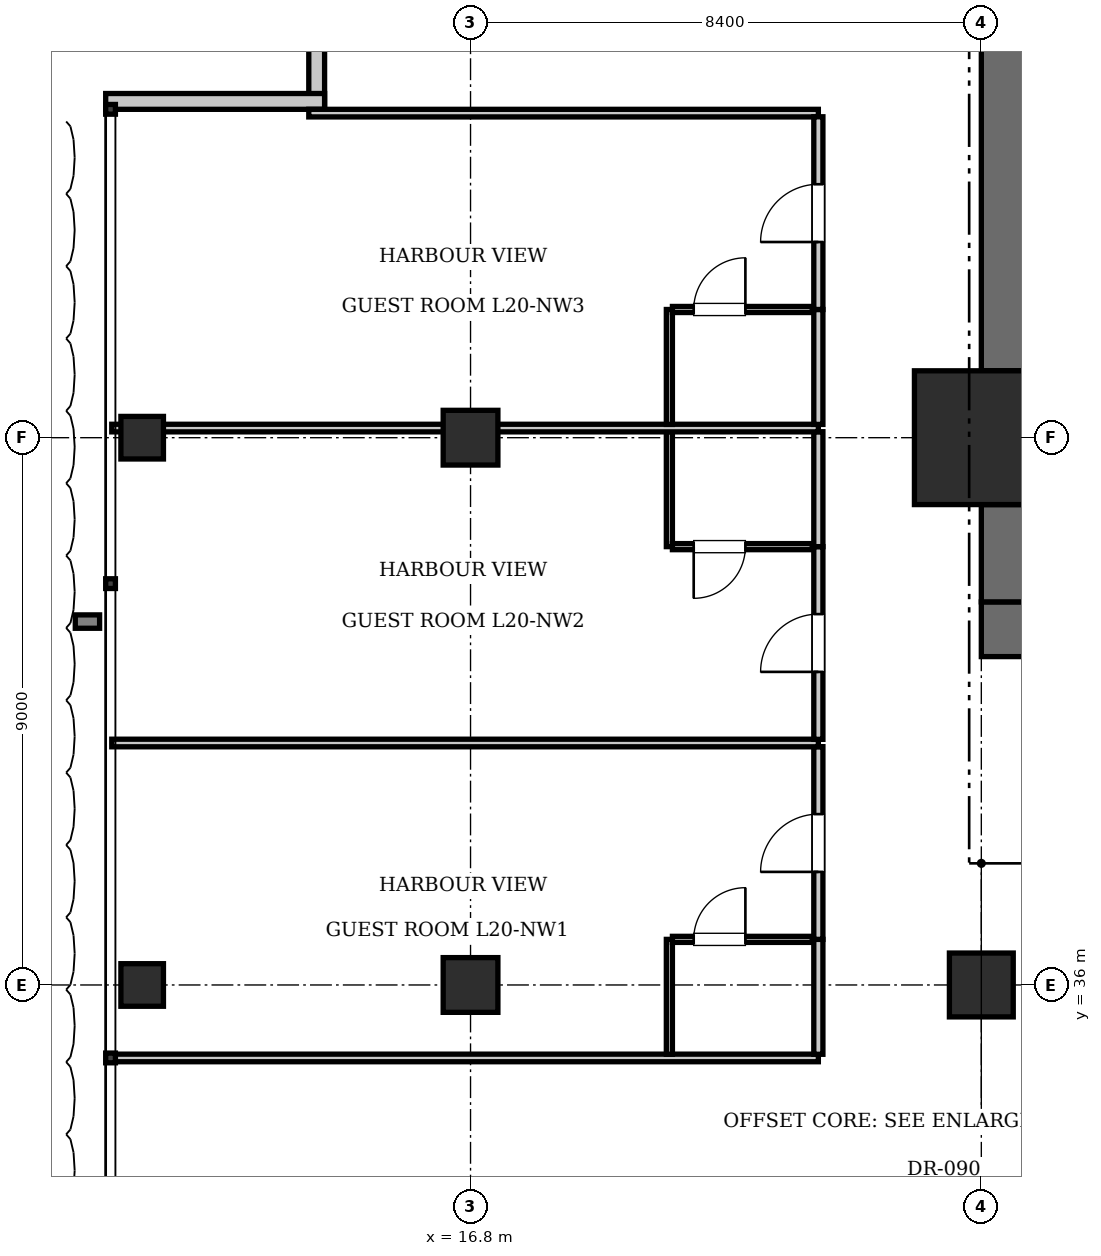
"""IFC4 building model, lengths in metres.
Left out: names, types, materials, properties, quantities, classifications, styles, units other than length and angle.
Written with IfcOpenShell. Run it as: python <this file> out.ifc"""

import sys

from ifc_helpers import new_model, si_unit, direction, frame, frame_2d, origin, origin_2d, place, context, subcontext, project, spatial, rectangle, i_section, extrude, element, fill, save


model = new_model("IFC4")
c1 = context("Model", 3, precision=1e-05, world=origin(), true_north=direction((0.0, 1.0)))
c2 = subcontext(c1, "Body", "Model", "MODEL_VIEW")
j1 = project(units=[si_unit("LENGTHUNIT", "METRE"), si_unit("PLANEANGLEUNIT", "RADIAN")], contexts=[c1])
p1 = place(None, origin())
s1 = spatial("IfcSite", under=j1, at=p1, CompositionType="ELEMENT")
p2 = place(p1, origin())
s2 = spatial("IfcBuilding", under=s1, at=p2, CompositionType="ELEMENT")
p3 = place(p2, frame((0.0, 0.0, 84.7)))
s3 = spatial("IfcBuildingStorey", under=s2, at=p3, CompositionType="ELEMENT", Elevation=84.7)
p4 = place(p3, frame((25.2, 45.0, 0.0), z_axis=(0.0, 0.0, 1.0), x_axis=(1.0, 0.0, 0.0)))
e1 = element("IfcColumn", 1, at=p4, inside=s3, PredefinedType="COLUMN", context=c2, shape_type="SweptSolid", body=[
    extrude(rectangle(XDim=2.2, YDim=2.2, at=origin_2d()), origin(), (0.0, 0.0, 1.0), 3.85),
])
p5 = place(p3, frame((25.2, 41.85, 0.0), z_axis=(0.0, 0.0, 1.0), x_axis=(1.0, 0.0, 0.0)))
e2 = element("IfcWall", 2, at=p5, inside=s3, PredefinedType="SHEAR", context=c2, shape_type="SweptSolid", body=[
    extrude(rectangle(XDim=6.8, YDim=0.9, at=frame_2d((3.4, 0.0))), origin(), (0.0, 0.0, 1.0), 3.85),
])
p6 = place(p5, frame((1.65, 0.0, 0.0)))
e3 = element("IfcOpeningElement", 3, at=p6, cuts=e2, PredefinedType="OPENING", context=c2, shape_type="SweptSolid", body=[
    extrude(rectangle(XDim=1.15, YDim=2.15, at=frame_2d((0.575, 1.075))), frame((0.0, 0.46, 0.0), z_axis=(0.0, -1.0, 0.0), x_axis=(1.0, 0.0, 0.0)), (0.0, 0.0, 1.0), 0.92),
])
p7 = place(p5, frame((5.15, 0.0, 0.0)))
e4 = element("IfcOpeningElement", 4, at=p7, cuts=e2, PredefinedType="OPENING", context=c2, shape_type="SweptSolid", body=[
    extrude(rectangle(XDim=1.1, YDim=2.2, at=frame_2d((0.55, 1.1))), frame((0.0, 0.46, 0.0), z_axis=(0.0, -1.0, 0.0), x_axis=(1.0, 0.0, 0.0)), (0.0, 0.0, 1.0), 0.92),
])
p8 = place(p3, frame((25.65, 42.3, 0.0), z_axis=(0.0, 0.0, 1.0), x_axis=(0.0, 1.0, 0.0)))
e5 = element("IfcWall", 5, at=p8, inside=s3, PredefinedType="SHEAR", context=c2, shape_type="SweptSolid", body=[
    extrude(rectangle(XDim=1.6, YDim=0.9, at=frame_2d((0.8, 0.0))), origin(), (0.0, 0.0, 1.0), 3.85),
])
p9 = place(p3, frame((25.65, 46.1, 0.0), z_axis=(0.0, 0.0, 1.0), x_axis=(0.0, 1.0, 0.0)))
e6 = element("IfcWall", 6, at=p9, inside=s3, PredefinedType="SHEAR", context=c2, shape_type="SweptSolid", body=[
    extrude(rectangle(XDim=7.0, YDim=0.9, at=frame_2d((3.5, 0.0))), origin(), (0.0, 0.0, 1.0), 3.85),
])
p10 = place(p3, frame((25.2, 36.0, 0.0), z_axis=(0.0, 0.0, 1.0), x_axis=(1.0, 0.0, 0.0)))
e7 = element("IfcColumn", 7, at=p10, inside=s3, PredefinedType="COLUMN", context=c2, shape_type="SweptSolid", body=[
    extrude(rectangle(XDim=1.05, YDim=1.05, at=origin_2d()), origin(), (0.0, 0.0, 1.0), 3.85),
])
for number, where, z_axis, x_axis in (
    (8, (16.8, 36.0, 0.0), (0.0, 0.0, 1.0), (1.0, 0.0, 0.0)),
    (9, (16.8, 45.0, 0.0), (0.0, 0.0, 1.0), (1.0, 0.0, 0.0)),
):
    element("IfcColumn", number, at=place(p3, frame(where, z_axis=z_axis, x_axis=x_axis)), inside=s3, PredefinedType="COLUMN", context=c2, shape_type="SweptSolid", body=[
        extrude(rectangle(XDim=0.9, YDim=0.9, at=origin_2d()), origin(), (0.0, 0.0, 1.0), 3.85),
    ])
for number, where, z_axis, x_axis in (
    (10, (11.4, 36.0, 0.0), (0.0, 0.0, 1.0), (1.0, 0.0, 0.0)),
    (11, (11.4, 45.0, 0.0), (0.0, 0.0, 1.0), (1.0, 0.0, 0.0)),
):
    element("IfcColumn", number, at=place(p3, frame(where, z_axis=z_axis, x_axis=x_axis)), inside=s3, PredefinedType="COLUMN", context=c2, shape_type="SweptSolid", body=[
        extrude(i_section(OverallWidth=0.7, OverallDepth=0.7, WebThickness=0.028, FlangeThickness=0.044, at=origin_2d()), origin(), (0.0, 0.0, 1.0), 3.85),
    ])
p11 = place(p3, frame((14.27, 50.4, 0.0), z_axis=(0.0, 0.0, 1.0), x_axis=(0.0, 1.0, 0.0)))
e12 = element("IfcWall", 12, at=p11, inside=s3, PredefinedType="SOLIDWALL", context=c2, shape_type="SweptSolid", body=[
    extrude(rectangle(XDim=3.6, YDim=0.26, at=frame_2d((1.8, 0.0))), origin(), (0.0, 0.0, 1.0), 3.61),
])
p12 = place(p3, frame((10.8, 50.53, 0.0), z_axis=(0.0, 0.0, 1.0), x_axis=(1.0, 0.0, 0.0)))
e13 = element("IfcWall", 13, at=p12, inside=s3, PredefinedType="SOLIDWALL", context=c2, shape_type="SweptSolid", body=[
    extrude(rectangle(XDim=3.6, YDim=0.26, at=frame_2d((1.8, 0.0))), origin(), (0.0, 0.0, 1.0), 3.61),
])
p13 = place(p3, frame((10.9, 34.8, 0.0), z_axis=(0.0, 0.0, 1.0), x_axis=(1.0, 0.0, 0.0)))
e14 = element("IfcWall", 14, at=p13, inside=s3, PredefinedType="PARTITIONING", context=c2, shape_type="SweptSolid", body=[
    extrude(rectangle(XDim=11.62, YDim=0.125, at=frame_2d((5.81, 0.0))), origin(), (0.0, 0.0, 1.0), 3.61),
])
p14 = place(p3, frame((14.14, 50.337, 0.0), z_axis=(0.0, 0.0, 1.0), x_axis=(1.0, 0.0, 0.0)))
e15 = element("IfcWall", 15, at=p14, inside=s3, PredefinedType="PARTITIONING", context=c2, shape_type="SweptSolid", body=[
    extrude(rectangle(XDim=8.38, YDim=0.125, at=frame_2d((4.19, 0.0))), origin(), (0.0, 0.0, 1.0), 3.61),
])
p15 = place(p3, frame((22.52, 34.86, 0.0), z_axis=(0.0, 0.0, 1.0), x_axis=(0.0, 1.0, 0.0)))
e16 = element("IfcWall", 16, at=p15, inside=s3, PredefinedType="PARTITIONING", context=c2, shape_type="SweptSolid", body=[
    extrude(rectangle(XDim=1.89, YDim=0.15, at=frame_2d((0.945, 0.0))), origin(), (0.0, 0.0, 1.0), 3.61),
])
p16 = place(p3, frame((22.52, 36.75, 0.0), z_axis=(0.0, 0.0, 1.0), x_axis=(0.0, 1.0, 0.0)))
e17 = element("IfcWall", 17, at=p16, inside=s3, PredefinedType="PARTITIONING", context=c2, shape_type="SweptSolid", body=[
    extrude(rectangle(XDim=3.169, YDim=0.15, at=frame_2d((1.584, 0.0))), origin(), (0.0, 0.0, 1.0), 3.61),
])
p17 = place(p16, frame((1.11, 0.0, 0.0)))
e18 = element("IfcOpeningElement", 18, at=p17, cuts=e17, PredefinedType="OPENING", context=c2, shape_type="SweptSolid", body=[
    extrude(rectangle(XDim=0.95, YDim=2.15, at=frame_2d((0.475, 1.075))), frame((0.0, 0.085, 0.0), z_axis=(0.0, -1.0, 0.0), x_axis=(1.0, 0.0, 0.0)), (0.0, 0.0, 1.0), 0.17),
])
p18 = place(p3, frame((20.07, 34.86, 0.0), z_axis=(0.0, 0.0, 1.0), x_axis=(0.0, 1.0, 0.0)))
e19 = element("IfcWall", 19, at=p18, inside=s3, PredefinedType="PARTITIONING", context=c2, shape_type="SweptSolid", body=[
    extrude(rectangle(XDim=1.89, YDim=0.1, at=frame_2d((0.945, 0.0))), origin(), (0.0, 0.0, 1.0), 3.61),
])
p19 = place(p3, frame((20.12, 36.75, 0.0), z_axis=(0.0, 0.0, 1.0), x_axis=(1.0, 0.0, 0.0)))
e20 = element("IfcWall", 20, at=p19, inside=s3, PredefinedType="PARTITIONING", context=c2, shape_type="SweptSolid", body=[
    extrude(rectangle(XDim=2.3, YDim=0.1, at=frame_2d((1.15, 0.0))), origin(), (0.0, 0.0, 1.0), 3.61),
])
p20 = place(p19, frame((0.35, 0.0, 0.0)))
e21 = element("IfcOpeningElement", 21, at=p20, cuts=e20, PredefinedType="OPENING", context=c2, shape_type="SweptSolid", body=[
    extrude(rectangle(XDim=0.85, YDim=2.1, at=frame_2d((0.425, 1.05))), frame((0.0, 0.06, 0.0), z_axis=(0.0, -1.0, 0.0), x_axis=(1.0, 0.0, 0.0)), (0.0, 0.0, 1.0), 0.12),
])
p21 = place(p3, frame((10.9, 39.979, 0.0), z_axis=(0.0, 0.0, 1.0), x_axis=(1.0, 0.0, 0.0)))
e22 = element("IfcWall", 22, at=p21, inside=s3, PredefinedType="PARTITIONING", context=c2, shape_type="SweptSolid", body=[
    extrude(rectangle(XDim=11.62, YDim=0.125, at=frame_2d((5.81, 0.0))), origin(), (0.0, 0.0, 1.0), 3.61),
])
p22 = place(p3, frame((22.52, 40.039, 0.0), z_axis=(0.0, 0.0, 1.0), x_axis=(0.0, 1.0, 0.0)))
e23 = element("IfcWall", 23, at=p22, inside=s3, PredefinedType="PARTITIONING", context=c2, shape_type="SweptSolid", body=[
    extrude(rectangle(XDim=3.169, YDim=0.15, at=frame_2d((1.584, 0.0))), origin(), (0.0, 0.0, 1.0), 3.61),
])
p23 = place(p22, frame((1.11, 0.0, 0.0)))
e24 = element("IfcOpeningElement", 24, at=p23, cuts=e23, PredefinedType="OPENING", context=c2, shape_type="SweptSolid", body=[
    extrude(rectangle(XDim=0.95, YDim=2.15, at=frame_2d((0.475, 1.075))), frame((0.0, 0.085, 0.0), z_axis=(0.0, -1.0, 0.0), x_axis=(1.0, 0.0, 0.0)), (0.0, 0.0, 1.0), 0.17),
])
p24 = place(p3, frame((22.52, 43.208, 0.0), z_axis=(0.0, 0.0, 1.0), x_axis=(0.0, 1.0, 0.0)))
e25 = element("IfcWall", 25, at=p24, inside=s3, PredefinedType="PARTITIONING", context=c2, shape_type="SweptSolid", body=[
    extrude(rectangle(XDim=1.89, YDim=0.15, at=frame_2d((0.945, 0.0))), origin(), (0.0, 0.0, 1.0), 3.61),
])
p25 = place(p3, frame((20.07, 43.208, 0.0), z_axis=(0.0, 0.0, 1.0), x_axis=(0.0, 1.0, 0.0)))
e26 = element("IfcWall", 26, at=p25, inside=s3, PredefinedType="PARTITIONING", context=c2, shape_type="SweptSolid", body=[
    extrude(rectangle(XDim=1.89, YDim=0.1, at=frame_2d((0.945, 0.0))), origin(), (0.0, 0.0, 1.0), 3.61),
])
p26 = place(p3, frame((20.12, 43.208, 0.0), z_axis=(0.0, 0.0, 1.0), x_axis=(1.0, 0.0, 0.0)))
e27 = element("IfcWall", 27, at=p26, inside=s3, PredefinedType="PARTITIONING", context=c2, shape_type="SweptSolid", body=[
    extrude(rectangle(XDim=2.3, YDim=0.1, at=frame_2d((1.15, 0.0))), origin(), (0.0, 0.0, 1.0), 3.61),
])
p27 = place(p26, frame((0.35, 0.0, 0.0)))
e28 = element("IfcOpeningElement", 28, at=p27, cuts=e27, PredefinedType="OPENING", context=c2, shape_type="SweptSolid", body=[
    extrude(rectangle(XDim=0.85, YDim=2.1, at=frame_2d((0.425, 1.05))), frame((0.0, 0.06, 0.0), z_axis=(0.0, -1.0, 0.0), x_axis=(1.0, 0.0, 0.0)), (0.0, 0.0, 1.0), 0.12),
])
p28 = place(p3, frame((10.9, 45.158, 0.0), z_axis=(0.0, 0.0, 1.0), x_axis=(1.0, 0.0, 0.0)))
e29 = element("IfcWall", 29, at=p28, inside=s3, PredefinedType="PARTITIONING", context=c2, shape_type="SweptSolid", body=[
    extrude(rectangle(XDim=11.62, YDim=0.125, at=frame_2d((5.81, 0.0))), origin(), (0.0, 0.0, 1.0), 2.999),
])
p29 = place(p3, frame((22.52, 45.218, 0.0), z_axis=(0.0, 0.0, 1.0), x_axis=(0.0, 1.0, 0.0)))
e30 = element("IfcWall", 30, at=p29, inside=s3, PredefinedType="PARTITIONING", context=c2, shape_type="SweptSolid", body=[
    extrude(rectangle(XDim=1.89, YDim=0.15, at=frame_2d((0.945, 0.0))), origin(), (0.0, 0.0, 1.0), 3.61),
])
p30 = place(p3, frame((22.52, 47.108, 0.0), z_axis=(0.0, 0.0, 1.0), x_axis=(0.0, 1.0, 0.0)))
e31 = element("IfcWall", 31, at=p30, inside=s3, PredefinedType="PARTITIONING", context=c2, shape_type="SweptSolid", body=[
    extrude(rectangle(XDim=3.169, YDim=0.15, at=frame_2d((1.584, 0.0))), origin(), (0.0, 0.0, 1.0), 3.61),
])
p31 = place(p30, frame((1.11, 0.0, 0.0)))
e32 = element("IfcOpeningElement", 32, at=p31, cuts=e31, PredefinedType="OPENING", context=c2, shape_type="SweptSolid", body=[
    extrude(rectangle(XDim=0.95, YDim=2.15, at=frame_2d((0.475, 1.075))), frame((0.0, 0.085, 0.0), z_axis=(0.0, -1.0, 0.0), x_axis=(1.0, 0.0, 0.0)), (0.0, 0.0, 1.0), 0.17),
])
p32 = place(p3, frame((20.07, 45.218, 0.0), z_axis=(0.0, 0.0, 1.0), x_axis=(0.0, 1.0, 0.0)))
e33 = element("IfcWall", 33, at=p32, inside=s3, PredefinedType="PARTITIONING", context=c2, shape_type="SweptSolid", body=[
    extrude(rectangle(XDim=1.89, YDim=0.1, at=frame_2d((0.945, 0.0))), origin(), (0.0, 0.0, 1.0), 3.61),
])
p33 = place(p3, frame((20.12, 47.108, 0.0), z_axis=(0.0, 0.0, 1.0), x_axis=(1.0, 0.0, 0.0)))
e34 = element("IfcWall", 34, at=p33, inside=s3, PredefinedType="PARTITIONING", context=c2, shape_type="SweptSolid", body=[
    extrude(rectangle(XDim=2.3, YDim=0.1, at=frame_2d((1.15, 0.0))), origin(), (0.0, 0.0, 1.0), 3.61),
])
p34 = place(p33, frame((0.35, 0.0, 0.0)))
e35 = element("IfcOpeningElement", 35, at=p34, cuts=e34, PredefinedType="OPENING", context=c2, shape_type="SweptSolid", body=[
    extrude(rectangle(XDim=0.85, YDim=2.1, at=frame_2d((0.425, 1.05))), frame((0.0, 0.06, 0.0), z_axis=(0.0, -1.0, 0.0), x_axis=(1.0, 0.0, 0.0)), (0.0, 0.0, 1.0), 0.12),
])
p35 = place(p20, origin())
e36 = element("IfcDoor", 36, at=p35, inside=s3, OperationType="SINGLE_SWING_RIGHT", PredefinedType="DOOR", context=c2, shape_type="SweptSolid", body=[
    extrude(rectangle(XDim=0.85, YDim=2.1, at=frame_2d((0.425, 1.05))), frame((0.0, 0.025, 0.0), z_axis=(0.0, -1.0, 0.0), x_axis=(1.0, 0.0, 0.0)), (0.0, 0.0, 1.0), 0.05),
])
fill(e21, e36)
p36 = place(p17, origin())
e37 = element("IfcDoor", 37, at=p36, inside=s3, OperationType="SINGLE_SWING_LEFT", PredefinedType="DOOR", context=c2, shape_type="SweptSolid", body=[
    extrude(rectangle(XDim=0.95, YDim=2.15, at=frame_2d((0.475, 1.075))), frame((0.0, 0.025, 0.0), z_axis=(0.0, -1.0, 0.0), x_axis=(1.0, 0.0, 0.0)), (0.0, 0.0, 1.0), 0.05),
])
fill(e18, e37)
p37 = place(p27, frame((0.85, 0.0, 0.0), z_axis=(0.0, 0.0, 1.0), x_axis=(-1.0, 0.0, 0.0)))
e38 = element("IfcDoor", 38, at=p37, inside=s3, OperationType="SINGLE_SWING_RIGHT", PredefinedType="DOOR", context=c2, shape_type="SweptSolid", body=[
    extrude(rectangle(XDim=0.85, YDim=2.1, at=frame_2d((0.425, 1.05))), frame((0.0, 0.025, 0.0), z_axis=(0.0, -1.0, 0.0), x_axis=(1.0, 0.0, 0.0)), (0.0, 0.0, 1.0), 0.05),
])
fill(e28, e38)
p38 = place(p23, origin())
e39 = element("IfcDoor", 39, at=p38, inside=s3, OperationType="SINGLE_SWING_LEFT", PredefinedType="DOOR", context=c2, shape_type="SweptSolid", body=[
    extrude(rectangle(XDim=0.95, YDim=2.15, at=frame_2d((0.475, 1.075))), frame((0.0, 0.025, 0.0), z_axis=(0.0, -1.0, 0.0), x_axis=(1.0, 0.0, 0.0)), (0.0, 0.0, 1.0), 0.05),
])
fill(e24, e39)
p39 = place(p34, origin())
e40 = element("IfcDoor", 40, at=p39, inside=s3, OperationType="SINGLE_SWING_RIGHT", PredefinedType="DOOR", context=c2, shape_type="SweptSolid", body=[
    extrude(rectangle(XDim=0.85, YDim=2.1, at=frame_2d((0.425, 1.05))), frame((0.0, 0.025, 0.0), z_axis=(0.0, -1.0, 0.0), x_axis=(1.0, 0.0, 0.0)), (0.0, 0.0, 1.0), 0.05),
])
fill(e35, e40)
p40 = place(p31, origin())
e41 = element("IfcDoor", 41, at=p40, inside=s3, OperationType="SINGLE_SWING_LEFT", PredefinedType="DOOR", context=c2, shape_type="SweptSolid", body=[
    extrude(rectangle(XDim=0.95, YDim=2.15, at=frame_2d((0.475, 1.075))), frame((0.0, 0.025, 0.0), z_axis=(0.0, -1.0, 0.0), x_axis=(1.0, 0.0, 0.0)), (0.0, 0.0, 1.0), 0.05),
])
fill(e32, e41)
save(model, sys.argv[1])
